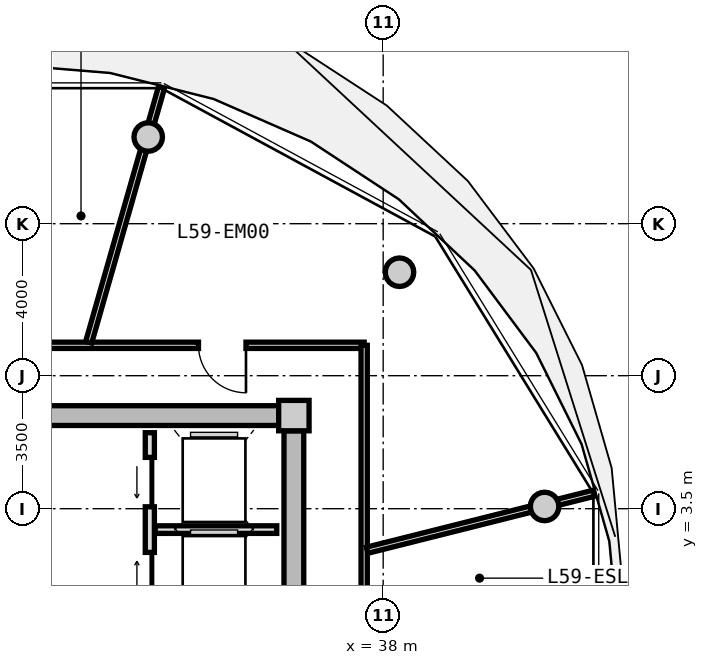
"""IFC4 building model, lengths in metres.
Left out: names, types, materials, properties, quantities, classifications, styles, units other than length and angle.
Written with IfcOpenShell. Run it as: python <this file> out.ifc"""

import sys

from ifc_helpers import new_model, si_unit, direction, frame, frame_2d, origin, origin_2d, place, context, subcontext, project, spatial, rectangle, circle, extrude, source, transform, mapped, element, fill, save


model = new_model("IFC4")
c1 = context("Model", 3, precision=1e-05, world=origin(), true_north=direction((0.0, 1.0)))
c2 = subcontext(c1, "Body", "Model", "MODEL_VIEW")
j1 = project(units=[si_unit("LENGTHUNIT", "METRE"), si_unit("PLANEANGLEUNIT", "RADIAN")], contexts=[c1])
p1 = place(None, origin())
s1 = spatial("IfcSite", under=j1, at=p1, CompositionType="ELEMENT")
p2 = place(p1, origin())
s2 = spatial("IfcBuilding", under=s1, at=p2, CompositionType="ELEMENT")
p3 = place(p2, frame((0.0, 0.0, 190.65)))
s3 = spatial("IfcBuildingStorey", under=s2, at=p3, CompositionType="ELEMENT", Elevation=190.65)
m1 = source(origin(), c2, "Body", "SweptSolid", [
    extrude(rectangle(XDim=0.8, YDim=0.8, at=origin_2d()), origin(), (0.0, 0.0, 1.0), 3.05),
])
p4 = place(p3, frame((35.65, 5.95, 0.0), z_axis=(0.0, 0.0, 1.0), x_axis=(1.0, 0.0, 0.0)))
e1 = element("IfcColumn", 1, at=p4, inside=s3, PredefinedType="COLUMN", context=c2, shape_type="MappedRepresentation", body=[
    mapped(m1, transform((0.0, 0.0, 0.0), x_axis=(1.0, 0.0, 0.0), y_axis=(0.0, 1.0, 0.0), z_axis=(0.0, 0.0, 1.0), scale=1.0)),
])
m2 = source(origin(), c2, "Body", "SweptSolid", [
    extrude(rectangle(XDim=14.5, YDim=0.52, at=frame_2d((7.25, 0.0))), origin(), (0.0, 0.0, 1.0), 2.81),
])
p5 = place(p3, frame((20.75, 5.95, 0.0), z_axis=(0.0, 0.0, 1.0), x_axis=(1.0, 0.0, 0.0)))
e2 = element("IfcWall", 2, at=p5, inside=s3, PredefinedType="SHEAR", context=c2, shape_type="MappedRepresentation", body=[
    mapped(m2, transform((0.0, 0.0, 0.0), x_axis=(1.0, 0.0, 0.0), y_axis=(0.0, 1.0, 0.0), z_axis=(0.0, 0.0, 1.0), scale=1.0)),
])
m3 = source(origin(), c2, "Body", "SweptSolid", [
    extrude(rectangle(XDim=11.1, YDim=0.52, at=frame_2d((5.55, 0.0))), origin(), (0.0, 0.0, 1.0), 2.81),
])
p6 = place(p3, frame((35.65, 5.55, 0.0), z_axis=(0.0, 0.0, 1.0), x_axis=(0.0, -1.0, 0.0)))
e3 = element("IfcWall", 3, at=p6, inside=s3, PredefinedType="SHEAR", context=c2, shape_type="MappedRepresentation", body=[
    mapped(m3, transform((0.0, 0.0, 0.0), x_axis=(1.0, 0.0, 0.0), y_axis=(0.0, 1.0, 0.0), z_axis=(0.0, 0.0, 1.0), scale=1.0)),
])
p7 = place(p6, frame((5.65, 0.0, 0.0)))
e4 = element("IfcOpeningElement", 4, at=p7, cuts=e3, PredefinedType="OPENING", context=c2, shape_type="SweptSolid", body=[
    extrude(rectangle(XDim=1.2, YDim=2.15, at=frame_2d((0.6, 1.075))), frame((0.0, 0.27, 0.0), z_axis=(0.0, -1.0, 0.0), x_axis=(1.0, 0.0, 0.0)), (0.0, 0.0, 1.0), 0.54),
])
p8 = place(p6, frame((9.3, 0.0, 0.0)))
e5 = element("IfcOpeningElement", 5, at=p8, cuts=e3, PredefinedType="OPENING", context=c2, shape_type="SweptSolid", body=[
    extrude(rectangle(XDim=1.0, YDim=2.1, at=frame_2d((0.5, 1.05))), frame((0.0, 0.27, 0.0), z_axis=(0.0, -1.0, 0.0), x_axis=(1.0, 0.0, 0.0)), (0.0, 0.0, 1.0), 0.54),
])
m4 = source(origin(), c2, "Body", "SweptSolid", [
    extrude(circle(Radius=0.375, at=origin_2d()), origin(), (0.0, 0.0, 1.0), 3.47),
])
for number, where, z_axis, x_axis in (
    (6, (42.247, 3.559, -0.42), (0.0, 0.0, 1.0), (1.0, 0.0, 0.0)),
    (7, (38.43, 9.723, -0.42), (0.0, 0.0, 1.0), (1.0, 0.0, 0.0)),
    (8, (31.818, 13.281, -0.42), (0.0, 0.0, 1.0), (1.0, 0.0, 0.0)),
):
    element("IfcColumn", number, at=place(p3, frame(where, z_axis=z_axis, x_axis=x_axis)), inside=s3, PredefinedType="COLUMN", context=c2, shape_type="MappedRepresentation", body=[
        mapped(m4, transform((0.0, 0.0, 0.0), x_axis=(1.0, 0.0, 0.0), y_axis=(0.0, 1.0, 0.0), z_axis=(0.0, 0.0, 1.0), scale=1.0)),
    ])
m5 = source(origin(), c2, "Body", "SweptSolid", [
    extrude(rectangle(XDim=5.0, YDim=0.24, at=frame_2d((2.5, 0.0))), origin(), (0.0, 0.0, 1.0), 2.795),
])
p9 = place(p3, frame((31.86, 0.5, 0.0), z_axis=(0.0, 0.0, 1.0), x_axis=(0.0, 1.0, 0.0)))
e9 = element("IfcWall", 9, at=p9, inside=s3, PredefinedType="PARTITIONING", context=c2, shape_type="MappedRepresentation", body=[
    mapped(m5, transform((0.0, 0.0, 0.0), x_axis=(1.0, 0.0, 0.0), y_axis=(0.0, 1.0, 0.0), z_axis=(0.0, 0.0, 1.0), scale=1.0)),
])
p10 = place(p9, frame((3.05, 0.0, 0.0)))
e10 = element("IfcOpeningElement", 10, at=p10, cuts=e9, PredefinedType="OPENING", context=c2, shape_type="SweptSolid", body=[
    extrude(rectangle(XDim=1.3, YDim=2.2, at=frame_2d((0.65, 1.1))), frame((0.0, 0.13, 0.0), z_axis=(0.0, -1.0, 0.0), x_axis=(1.0, 0.0, 0.0)), (0.0, 0.0, 1.0), 0.26),
])
p11 = place(p9, frame((0.55, 0.0, 0.0)))
e11 = element("IfcOpeningElement", 11, at=p11, cuts=e9, PredefinedType="OPENING", context=c2, shape_type="SweptSolid", body=[
    extrude(rectangle(XDim=1.3, YDim=2.2, at=frame_2d((0.65, 1.1))), frame((0.0, 0.13, 0.0), z_axis=(0.0, -1.0, 0.0), x_axis=(1.0, 0.0, 0.0)), (0.0, 0.0, 1.0), 0.26),
])
m6 = source(origin(), c2, "Body", "SweptSolid", [
    extrude(rectangle(XDim=3.2, YDim=0.2, at=frame_2d((1.6, 0.0))), origin(), (0.0, 0.0, 1.0), 2.795),
])
p12 = place(p3, frame((32.0, 2.95, 0.0), z_axis=(0.0, 0.0, 1.0), x_axis=(1.0, 0.0, 0.0)))
e12 = element("IfcWall", 12, at=p12, inside=s3, PredefinedType="PARTITIONING", context=c2, shape_type="MappedRepresentation", body=[
    mapped(m6, transform((0.0, 0.0, 0.0), x_axis=(1.0, 0.0, 0.0), y_axis=(0.0, 1.0, 0.0), z_axis=(0.0, 0.0, 1.0), scale=1.0)),
])
m7 = source(origin(), c2, "Body", "SweptSolid", [
    extrude(rectangle(XDim=8.58, YDim=0.165, at=frame_2d((4.29, 0.0))), origin(), (0.0, 0.0, 1.0), 2.795),
])
p13 = place(p3, frame((28.92, 7.8, 0.0), z_axis=(0.0, 0.0, 1.0), x_axis=(1.0, 0.0, 0.0)))
e13 = element("IfcWall", 13, at=p13, inside=s3, PredefinedType="PARTITIONING", context=c2, shape_type="MappedRepresentation", body=[
    mapped(m7, transform((0.0, 0.0, 0.0), x_axis=(1.0, 0.0, 0.0), y_axis=(0.0, 1.0, 0.0), z_axis=(0.0, 0.0, 1.0), scale=1.0)),
])
p14 = place(p13, frame((4.22, 0.0, 0.0)))
e14 = element("IfcOpeningElement", 14, at=p14, cuts=e13, PredefinedType="OPENING", context=c2, shape_type="SweptSolid", body=[
    extrude(rectangle(XDim=1.25, YDim=2.2, at=frame_2d((0.625, 1.1))), frame((0.0, 0.093, 0.0), z_axis=(0.0, -1.0, 0.0), x_axis=(1.0, 0.0, 0.0)), (0.0, 0.0, 1.0), 0.185),
])
m8 = source(origin(), c2, "Body", "SweptSolid", [
    extrude(rectangle(XDim=6.88, YDim=0.165, at=frame_2d((3.44, 0.0))), origin(), (0.0, 0.0, 1.0), 2.795),
])
p15 = place(p3, frame((37.5, 7.8, 0.0), z_axis=(0.0, 0.0, 1.0), x_axis=(0.0, -1.0, 0.0)))
e15 = element("IfcWall", 15, at=p15, inside=s3, PredefinedType="PARTITIONING", context=c2, shape_type="MappedRepresentation", body=[
    mapped(m8, transform((0.0, 0.0, 0.0), x_axis=(1.0, 0.0, 0.0), y_axis=(0.0, 1.0, 0.0), z_axis=(0.0, 0.0, 1.0), scale=1.0)),
])
m9 = source(origin(), c2, "Body", "SweptSolid", [
    extrude(rectangle(XDim=6.974, YDim=0.165, at=frame_2d((3.487, 0.0))), origin(), (0.0, 0.0, 1.0), 2.395),
])
p16 = place(p3, frame((30.251, 7.88, 0.0), z_axis=(0.0, 0.0, 1.0), x_axis=(0.274707256801, 0.961527910703, 0.0)))
e16 = element("IfcWall", 16, at=p16, inside=s3, PredefinedType="PARTITIONING", context=c2, shape_type="MappedRepresentation", body=[
    mapped(m9, transform((0.0, 0.0, 0.0), x_axis=(1.0, 0.0, 0.0), y_axis=(0.0, 1.0, 0.0), z_axis=(0.0, 0.0, 1.0), scale=1.0)),
])
m10 = source(origin(), c2, "Body", "SweptSolid", [
    extrude(rectangle(XDim=6.157, YDim=0.165, at=frame_2d((3.079, 0.0))), origin(), (0.0, 0.0, 1.0), 2.395),
])
p17 = place(p3, frame((37.58, 2.407, 0.0), z_axis=(0.0, 0.0, 1.0), x_axis=(0.969840867184, 0.243738984038, 0.0)))
e17 = element("IfcWall", 17, at=p17, inside=s3, PredefinedType="PARTITIONING", context=c2, shape_type="MappedRepresentation", body=[
    mapped(m10, transform((0.0, 0.0, 0.0), x_axis=(1.0, 0.0, 0.0), y_axis=(0.0, 1.0, 0.0), z_axis=(0.0, 0.0, 1.0), scale=1.0)),
])
m11 = source(origin(), c2, "Body", "SweptSolid", [
    extrude(rectangle(XDim=1.3, YDim=2.2, at=frame_2d((0.65, 1.1))), frame((0.0, 0.025, 0.0), z_axis=(0.0, -1.0, 0.0), x_axis=(1.0, 0.0, 0.0)), (0.0, 0.0, 1.0), 0.05),
])
p18 = place(p10, origin())
e18 = element("IfcDoor", 18, at=p18, inside=s3, OperationType="SLIDING_TO_LEFT", PredefinedType="DOOR", context=c2, shape_type="MappedRepresentation", body=[
    mapped(m11, transform((0.0, 0.0, 0.0), x_axis=(1.0, 0.0, 0.0), y_axis=(0.0, 1.0, 0.0), z_axis=(0.0, 0.0, 1.0), scale=1.0)),
])
fill(e10, e18)
p19 = place(p11, origin())
e19 = element("IfcDoor", 19, at=p19, inside=s3, OperationType="SLIDING_TO_RIGHT", PredefinedType="DOOR", context=c2, shape_type="MappedRepresentation", body=[
    mapped(m11, transform((0.0, 0.0, 0.0), x_axis=(1.0, 0.0, 0.0), y_axis=(0.0, 1.0, 0.0), z_axis=(0.0, 0.0, 1.0), scale=1.0)),
])
fill(e11, e19)
m12 = source(origin(), c2, "Body", "SweptSolid", [
    extrude(rectangle(XDim=1.25, YDim=2.2, at=frame_2d((0.625, 1.1))), frame((0.0, 0.025, 0.0), z_axis=(0.0, -1.0, 0.0), x_axis=(1.0, 0.0, 0.0)), (0.0, 0.0, 1.0), 0.05),
])
p20 = place(p14, frame((1.25, 0.0, 0.0), z_axis=(0.0, 0.0, 1.0), x_axis=(-1.0, 0.0, 0.0)))
e20 = element("IfcDoor", 20, at=p20, inside=s3, OperationType="SINGLE_SWING_LEFT", PredefinedType="DOOR", context=c2, shape_type="MappedRepresentation", body=[
    mapped(m12, transform((0.0, 0.0, 0.0), x_axis=(1.0, 0.0, 0.0), y_axis=(0.0, 1.0, 0.0), z_axis=(0.0, 0.0, 1.0), scale=1.0)),
])
fill(e14, e20)
save(model, sys.argv[1])
